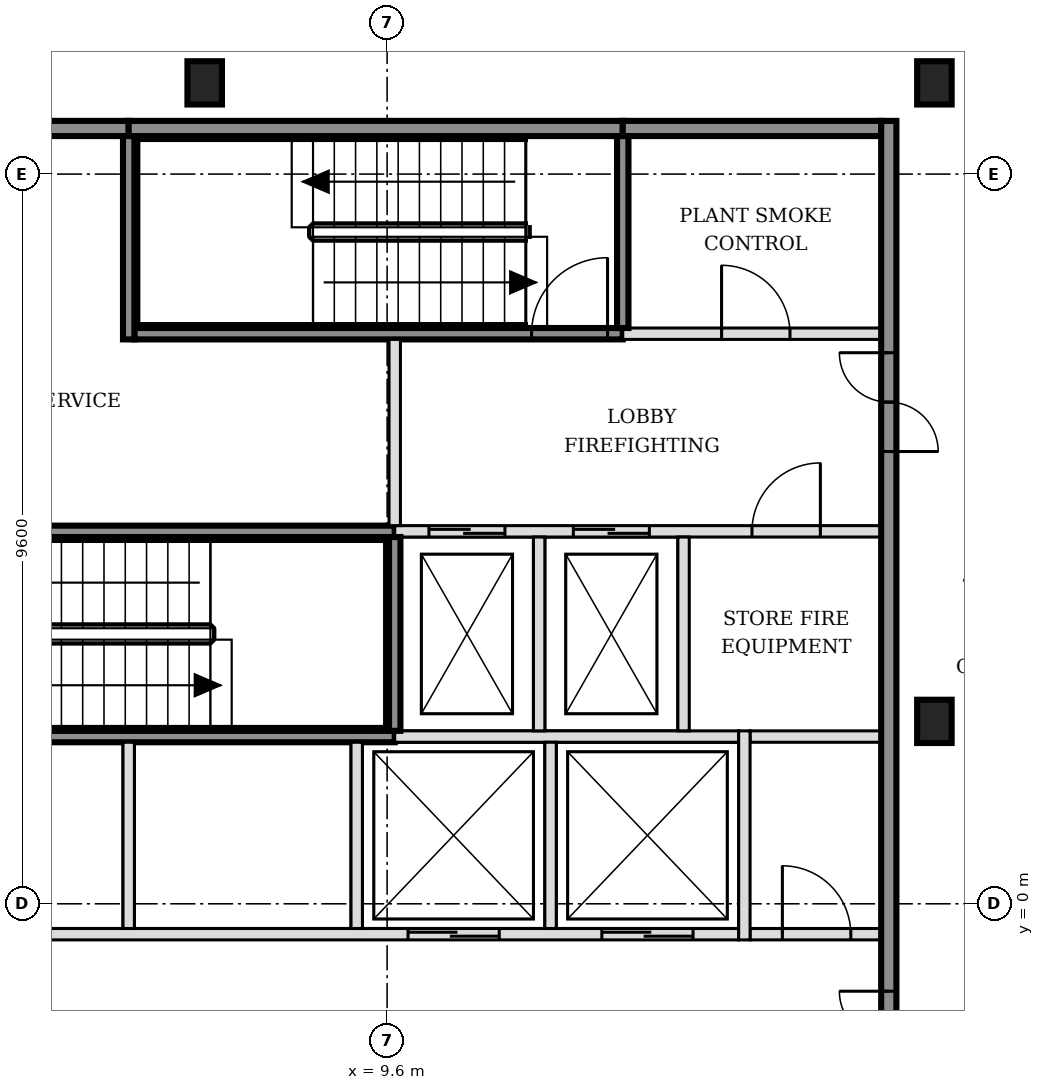
"""IFC4 building model, lengths in metres.
Left out: names, types, materials, properties, quantities, classifications, styles, units other than length and angle.
Written with IfcOpenShell. Run it as: python <this file> out.ifc"""

import sys

from ifc_helpers import new_model, si_unit, direction, frame, frame_2d, origin, origin_2d, place, context, subcontext, project, spatial, rectangle, i_section, extrude, element, fill, save


model = new_model("IFC4")
c1 = context("Model", 3, precision=1e-05, world=origin(), true_north=direction((0.0, 1.0)))
c2 = subcontext(c1, "Body", "Model", "MODEL_VIEW")
j1 = project(units=[si_unit("LENGTHUNIT", "METRE"), si_unit("PLANEANGLEUNIT", "RADIAN")], contexts=[c1])
p1 = place(None, origin())
s1 = spatial("IfcSite", under=j1, at=p1, CompositionType="ELEMENT")
p2 = place(p1, origin())
s2 = spatial("IfcBuilding", under=s1, at=p2, CompositionType="ELEMENT")
p3 = place(p2, frame((0.0, 0.0, 47.4)))
s3 = spatial("IfcBuildingStorey", under=s2, at=p3, CompositionType="ELEMENT", Elevation=47.4)
for number, where, z_axis, x_axis in (
    (1, (16.8, 2.4, -0.15), (0.0, 0.0, 1.0), (1.0, 0.0, 0.0)),
    (2, (7.2, 10.8, -0.15), (0.0, 0.0, 1.0), (1.0, 0.0, 0.0)),
    (3, (16.8, 10.8, -0.15), (0.0, 0.0, 1.0), (1.0, 0.0, 0.0)),
):
    element("IfcColumn", number, at=place(p3, frame(where, z_axis=z_axis, x_axis=x_axis)), inside=s3, PredefinedType="COLUMN", context=c2, shape_type="SweptSolid", body=[
        extrude(i_section(OverallWidth=0.454, OverallDepth=0.569, WebThickness=0.078, FlangeThickness=0.125, FilletRadius=0.015, at=origin_2d()), origin(), (0.0, 0.0, 1.0), 3.6),
    ])
p4 = place(p3, frame((-1.7, -0.4, 0.0), z_axis=(0.0, 0.0, 1.0), x_axis=(1.0, 0.0, 0.0)))
e4 = element("IfcWall", 4, at=p4, inside=s3, PredefinedType="SOLIDWALL", context=c2, shape_type="SweptSolid", body=[
    extrude(rectangle(XDim=15.925, YDim=0.15, at=frame_2d((7.962, 0.0))), origin(), (0.0, 0.0, 1.0), 3.45),
])
p5 = place(p4, frame((0.6, 0.0, 0.0)))
e5 = element("IfcOpeningElement", 5, at=p5, cuts=e4, PredefinedType="OPENING", context=c2, shape_type="SweptSolid", body=[
    extrude(rectangle(XDim=1.1, YDim=2.1, at=frame_2d((0.55, 1.05))), frame((0.0, 0.085, 0.0), z_axis=(0.0, -1.0, 0.0), x_axis=(1.0, 0.0, 0.0)), (0.0, 0.0, 1.0), 0.17),
])
p6 = place(p4, frame((3.1, 0.0, 0.0)))
e6 = element("IfcOpeningElement", 6, at=p6, cuts=e4, PredefinedType="OPENING", context=c2, shape_type="SweptSolid", body=[
    extrude(rectangle(XDim=1.1, YDim=2.1, at=frame_2d((0.55, 1.05))), frame((0.0, 0.085, 0.0), z_axis=(0.0, -1.0, 0.0), x_axis=(1.0, 0.0, 0.0)), (0.0, 0.0, 1.0), 0.17),
])
p7 = place(p4, frame((11.575, 0.0, 0.0)))
e7 = element("IfcOpeningElement", 7, at=p7, cuts=e4, PredefinedType="OPENING", context=c2, shape_type="SweptSolid", body=[
    extrude(rectangle(XDim=1.2, YDim=2.1, at=frame_2d((0.6, 1.05))), frame((0.0, 0.085, 0.0), z_axis=(0.0, -1.0, 0.0), x_axis=(1.0, 0.0, 0.0)), (0.0, 0.0, 1.0), 0.17),
])
p8 = place(p4, frame((14.125, 0.0, 0.0)))
e8 = element("IfcOpeningElement", 8, at=p8, cuts=e4, PredefinedType="OPENING", context=c2, shape_type="SweptSolid", body=[
    extrude(rectangle(XDim=1.2, YDim=2.1, at=frame_2d((0.6, 1.05))), frame((0.0, 0.085, 0.0), z_axis=(0.0, -1.0, 0.0), x_axis=(1.0, 0.0, 0.0)), (0.0, 0.0, 1.0), 0.17),
])
p9 = place(p3, frame((14.375, -0.4, 0.0), z_axis=(0.0, 0.0, 1.0), x_axis=(1.0, 0.0, 0.0)))
e9 = element("IfcWall", 9, at=p9, inside=s3, PredefinedType="PARTITIONING", context=c2, shape_type="SweptSolid", body=[
    extrude(rectangle(XDim=1.725, YDim=0.15, at=frame_2d((0.863, 0.0))), origin(), (0.0, 0.0, 1.0), 3.45),
])
p10 = place(p9, frame((0.425, 0.0, 0.0)))
e10 = element("IfcOpeningElement", 10, at=p10, cuts=e9, PredefinedType="OPENING", context=c2, shape_type="SweptSolid", body=[
    extrude(rectangle(XDim=0.9, YDim=2.1, at=frame_2d((0.45, 1.05))), frame((0.0, 0.085, 0.0), z_axis=(0.0, -1.0, 0.0), x_axis=(1.0, 0.0, 0.0)), (0.0, 0.0, 1.0), 0.17),
])
p11 = place(p3, frame((3.2, 2.2, 0.0), z_axis=(0.0, 0.0, 1.0), x_axis=(1.0, 0.0, 0.0)))
e11 = element("IfcWall", 11, at=p11, inside=s3, PredefinedType="SOLIDWALL", context=c2, shape_type="SweptSolid", body=[
    extrude(rectangle(XDim=6.5, YDim=0.15, at=frame_2d((3.25, 0.0))), origin(), (0.0, 0.0, 1.0), 3.45),
])
p12 = place(p3, frame((9.7, 2.2, 0.0), z_axis=(0.0, 0.0, 1.0), x_axis=(1.0, 0.0, 0.0)))
e12 = element("IfcWall", 12, at=p12, inside=s3, PredefinedType="SOLIDWALL", context=c2, shape_type="SweptSolid", body=[
    extrude(rectangle(XDim=4.525, YDim=0.15, at=frame_2d((2.263, 0.0))), origin(), (0.0, 0.0, 1.0), 3.45),
])
p13 = place(p3, frame((14.375, 2.2, 0.0), z_axis=(0.0, 0.0, 1.0), x_axis=(1.0, 0.0, 0.0)))
e13 = element("IfcWall", 13, at=p13, inside=s3, PredefinedType="PARTITIONING", context=c2, shape_type="SweptSolid", body=[
    extrude(rectangle(XDim=1.725, YDim=0.15, at=frame_2d((0.863, 0.0))), origin(), (0.0, 0.0, 1.0), 3.45),
])
p14 = place(p3, frame((3.275, 4.9, 0.0), z_axis=(0.0, 0.0, 1.0), x_axis=(1.0, 0.0, 0.0)))
e14 = element("IfcWall", 14, at=p14, inside=s3, PredefinedType="SOLIDWALL", context=c2, shape_type="SweptSolid", body=[
    extrude(rectangle(XDim=6.425, YDim=0.15, at=frame_2d((3.212, 0.0))), origin(), (0.0, 0.0, 1.0), 3.45),
])
p15 = place(p14, frame((0.1, 0.0, 0.0)))
e15 = element("IfcOpeningElement", 15, at=p15, cuts=e14, PredefinedType="OPENING", context=c2, shape_type="SweptSolid", body=[
    extrude(rectangle(XDim=1.0, YDim=2.1, at=frame_2d((0.5, 1.05))), frame((0.0, 0.085, 0.0), z_axis=(0.0, -1.0, 0.0), x_axis=(1.0, 0.0, 0.0)), (0.0, 0.0, 1.0), 0.17),
])
p16 = place(p3, frame((9.7, 4.9, 0.0), z_axis=(0.0, 0.0, 1.0), x_axis=(1.0, 0.0, 0.0)))
e16 = element("IfcWall", 16, at=p16, inside=s3, PredefinedType="SOLIDWALL", context=c2, shape_type="SweptSolid", body=[
    extrude(rectangle(XDim=6.4, YDim=0.15, at=frame_2d((3.2, 0.0))), origin(), (0.0, 0.0, 1.0), 3.45),
])
p17 = place(p16, frame((0.45, 0.0, 0.0)))
e17 = element("IfcOpeningElement", 17, at=p17, cuts=e16, PredefinedType="OPENING", context=c2, shape_type="SweptSolid", body=[
    extrude(rectangle(XDim=1.0, YDim=2.1, at=frame_2d((0.5, 1.05))), frame((0.0, 0.085, 0.0), z_axis=(0.0, -1.0, 0.0), x_axis=(1.0, 0.0, 0.0)), (0.0, 0.0, 1.0), 0.17),
])
p18 = place(p16, frame((2.35, 0.0, 0.0)))
e18 = element("IfcOpeningElement", 18, at=p18, cuts=e16, PredefinedType="OPENING", context=c2, shape_type="SweptSolid", body=[
    extrude(rectangle(XDim=1.0, YDim=2.1, at=frame_2d((0.5, 1.05))), frame((0.0, 0.085, 0.0), z_axis=(0.0, -1.0, 0.0), x_axis=(1.0, 0.0, 0.0)), (0.0, 0.0, 1.0), 0.17),
])
p19 = place(p16, frame((4.7, 0.0, 0.0)))
e19 = element("IfcOpeningElement", 19, at=p19, cuts=e16, PredefinedType="OPENING", context=c2, shape_type="SweptSolid", body=[
    extrude(rectangle(XDim=0.9, YDim=2.1, at=frame_2d((0.45, 1.05))), frame((0.0, 0.085, 0.0), z_axis=(0.0, -1.0, 0.0), x_axis=(1.0, 0.0, 0.0)), (0.0, 0.0, 1.0), 0.17),
])
p20 = place(p3, frame((6.275, 7.5, 0.0), z_axis=(0.0, 0.0, 1.0), x_axis=(1.0, 0.0, 0.0)))
e20 = element("IfcWall", 20, at=p20, inside=s3, PredefinedType="SOLIDWALL", context=c2, shape_type="SweptSolid", body=[
    extrude(rectangle(XDim=6.425, YDim=0.15, at=frame_2d((3.212, 0.0))), origin(), (0.0, 0.0, 1.0), 3.45),
])
p21 = place(p20, frame((5.225, 0.0, 0.0)))
e21 = element("IfcOpeningElement", 21, at=p21, cuts=e20, PredefinedType="OPENING", context=c2, shape_type="SweptSolid", body=[
    extrude(rectangle(XDim=1.0, YDim=2.1, at=frame_2d((0.5, 1.05))), frame((0.0, 0.085, 0.0), z_axis=(0.0, -1.0, 0.0), x_axis=(1.0, 0.0, 0.0)), (0.0, 0.0, 1.0), 0.17),
])
p22 = place(p3, frame((12.7, 7.5, 0.0), z_axis=(0.0, 0.0, 1.0), x_axis=(1.0, 0.0, 0.0)))
e22 = element("IfcWall", 22, at=p22, inside=s3, PredefinedType="SOLIDWALL", context=c2, shape_type="SweptSolid", body=[
    extrude(rectangle(XDim=3.4, YDim=0.15, at=frame_2d((1.7, 0.0))), origin(), (0.0, 0.0, 1.0), 3.45),
])
p23 = place(p22, frame((1.3, 0.0, 0.0)))
e23 = element("IfcOpeningElement", 23, at=p23, cuts=e22, PredefinedType="OPENING", context=c2, shape_type="SweptSolid", body=[
    extrude(rectangle(XDim=0.9, YDim=2.1, at=frame_2d((0.45, 1.05))), frame((0.0, 0.085, 0.0), z_axis=(0.0, -1.0, 0.0), x_axis=(1.0, 0.0, 0.0)), (0.0, 0.0, 1.0), 0.17),
])
p24 = place(p3, frame((-1.7, 10.2, 0.0), z_axis=(0.0, 0.0, 1.0), x_axis=(1.0, 0.0, 0.0)))
e24 = element("IfcWall", 24, at=p24, inside=s3, PredefinedType="SOLIDWALL", context=c2, shape_type="SweptSolid", body=[
    extrude(rectangle(XDim=7.9, YDim=0.2, at=frame_2d((3.95, 0.0))), origin(), (0.0, 0.0, 1.0), 3.45),
])
p25 = place(p3, frame((6.2, 10.2, 0.0), z_axis=(0.0, 0.0, 1.0), x_axis=(1.0, 0.0, 0.0)))
e25 = element("IfcWall", 25, at=p25, inside=s3, PredefinedType="SOLIDWALL", context=c2, shape_type="SweptSolid", body=[
    extrude(rectangle(XDim=6.5, YDim=0.2, at=frame_2d((3.25, 0.0))), origin(), (0.0, 0.0, 1.0), 3.45),
])
p26 = place(p3, frame((12.7, 10.2, 0.0), z_axis=(0.0, 0.0, 1.0), x_axis=(1.0, 0.0, 0.0)))
e26 = element("IfcWall", 26, at=p26, inside=s3, PredefinedType="SOLIDWALL", context=c2, shape_type="SweptSolid", body=[
    extrude(rectangle(XDim=3.4, YDim=0.2, at=frame_2d((1.7, 0.0))), origin(), (0.0, 0.0, 1.0), 3.45),
])
p27 = place(p3, frame((6.2, -0.325, 0.0), z_axis=(0.0, 0.0, 1.0), x_axis=(0.0, 1.0, 0.0)))
e27 = element("IfcWall", 27, at=p27, inside=s3, PredefinedType="SOLIDWALL", context=c2, shape_type="SweptSolid", body=[
    extrude(rectangle(XDim=2.45, YDim=0.15, at=frame_2d((1.225, 0.0))), origin(), (0.0, 0.0, 1.0), 3.45),
])
p28 = place(p3, frame((6.2, 7.425, 0.0), z_axis=(0.0, 0.0, 1.0), x_axis=(0.0, 1.0, 0.0)))
e28 = element("IfcWall", 28, at=p28, inside=s3, PredefinedType="SOLIDWALL", context=c2, shape_type="SweptSolid", body=[
    extrude(rectangle(XDim=2.675, YDim=0.15, at=frame_2d((1.337, 0.0))), origin(), (0.0, 0.0, 1.0), 3.45),
])
p29 = place(p3, frame((9.2, -0.325, 0.0), z_axis=(0.0, 0.0, 1.0), x_axis=(0.0, 1.0, 0.0)))
e29 = element("IfcWall", 29, at=p29, inside=s3, PredefinedType="SOLIDWALL", context=c2, shape_type="SweptSolid", body=[
    extrude(rectangle(XDim=2.45, YDim=0.15, at=frame_2d((1.225, 0.0))), origin(), (0.0, 0.0, 1.0), 3.45),
])
p30 = place(p3, frame((9.7, 2.275, 0.0), z_axis=(0.0, 0.0, 1.0), x_axis=(0.0, 1.0, 0.0)))
e30 = element("IfcWall", 30, at=p30, inside=s3, PredefinedType="SOLIDWALL", context=c2, shape_type="SweptSolid", body=[
    extrude(rectangle(XDim=2.55, YDim=0.15, at=frame_2d((1.275, 0.0))), origin(), (0.0, 0.0, 1.0), 3.45),
])
p31 = place(p3, frame((9.7, 4.975, 0.0), z_axis=(0.0, 0.0, 1.0), x_axis=(0.0, 1.0, 0.0)))
e31 = element("IfcWall", 31, at=p31, inside=s3, PredefinedType="SOLIDWALL", context=c2, shape_type="SweptSolid", body=[
    extrude(rectangle(XDim=2.45, YDim=0.15, at=frame_2d((1.225, 0.0))), origin(), (0.0, 0.0, 1.0), 3.45),
])
p32 = place(p3, frame((11.6, 2.275, 0.0), z_axis=(0.0, 0.0, 1.0), x_axis=(0.0, 1.0, 0.0)))
e32 = element("IfcWall", 32, at=p32, inside=s3, PredefinedType="SOLIDWALL", context=c2, shape_type="SweptSolid", body=[
    extrude(rectangle(XDim=2.55, YDim=0.15, at=frame_2d((1.275, 0.0))), origin(), (0.0, 0.0, 1.0), 3.45),
])
p33 = place(p3, frame((11.75, -0.325, 0.0), z_axis=(0.0, 0.0, 1.0), x_axis=(0.0, 1.0, 0.0)))
e33 = element("IfcWall", 33, at=p33, inside=s3, PredefinedType="SOLIDWALL", context=c2, shape_type="SweptSolid", body=[
    extrude(rectangle(XDim=2.45, YDim=0.15, at=frame_2d((1.225, 0.0))), origin(), (0.0, 0.0, 1.0), 3.45),
])
p34 = place(p3, frame((12.7, 7.575, 0.0), z_axis=(0.0, 0.0, 1.0), x_axis=(0.0, 1.0, 0.0)))
e34 = element("IfcWall", 34, at=p34, inside=s3, PredefinedType="SOLIDWALL", context=c2, shape_type="SweptSolid", body=[
    extrude(rectangle(XDim=2.525, YDim=0.15, at=frame_2d((1.263, 0.0))), origin(), (0.0, 0.0, 1.0), 3.45),
])
p35 = place(p3, frame((13.5, 2.275, 0.0), z_axis=(0.0, 0.0, 1.0), x_axis=(0.0, 1.0, 0.0)))
e35 = element("IfcWall", 35, at=p35, inside=s3, PredefinedType="SOLIDWALL", context=c2, shape_type="SweptSolid", body=[
    extrude(rectangle(XDim=2.55, YDim=0.15, at=frame_2d((1.275, 0.0))), origin(), (0.0, 0.0, 1.0), 3.45),
])
p36 = place(p3, frame((14.3, -0.475, 0.0), z_axis=(0.0, 0.0, 1.0), x_axis=(0.0, 1.0, 0.0)))
e36 = element("IfcWall", 36, at=p36, inside=s3, PredefinedType="SOLIDWALL", context=c2, shape_type="SweptSolid", body=[
    extrude(rectangle(XDim=2.75, YDim=0.15, at=frame_2d((1.375, 0.0))), origin(), (0.0, 0.0, 1.0), 3.45),
])
p37 = place(p3, frame((16.2, -5.5, 0.0), z_axis=(0.0, 0.0, 1.0), x_axis=(0.0, 1.0, 0.0)))
e37 = element("IfcWall", 37, at=p37, inside=s3, PredefinedType="SOLIDWALL", context=c2, shape_type="SweptSolid", body=[
    extrude(rectangle(XDim=15.8, YDim=0.2, at=frame_2d((7.9, 0.0))), origin(), (0.0, 0.0, 1.0), 3.45),
])
p38 = place(p37, frame((3.05, 0.0, 0.0)))
e38 = element("IfcOpeningElement", 38, at=p38, cuts=e37, PredefinedType="OPENING", context=c2, shape_type="SweptSolid", body=[
    extrude(rectangle(XDim=1.3, YDim=2.1, at=frame_2d((0.65, 1.05))), frame((0.0, 0.11, 0.0), z_axis=(0.0, -1.0, 0.0), x_axis=(1.0, 0.0, 0.0)), (0.0, 0.0, 1.0), 0.22),
])
p39 = place(p37, frame((11.45, 0.0, 0.0)))
e39 = element("IfcOpeningElement", 39, at=p39, cuts=e37, PredefinedType="OPENING", context=c2, shape_type="SweptSolid", body=[
    extrude(rectangle(XDim=1.3, YDim=2.1, at=frame_2d((0.65, 1.05))), frame((0.0, 0.11, 0.0), z_axis=(0.0, -1.0, 0.0), x_axis=(1.0, 0.0, 0.0)), (0.0, 0.0, 1.0), 0.22),
])
p40 = place(p7, origin())
e40 = element("IfcDoor", 40, at=p40, inside=s3, OperationType="DOUBLE_DOOR_SLIDING", PredefinedType="DOOR", context=c2, shape_type="SweptSolid", body=[
    extrude(rectangle(XDim=1.2, YDim=2.1, at=frame_2d((0.6, 1.05))), frame((0.0, 0.025, 0.0), z_axis=(0.0, -1.0, 0.0), x_axis=(1.0, 0.0, 0.0)), (0.0, 0.0, 1.0), 0.05),
])
fill(e7, e40)
p41 = place(p8, origin())
e41 = element("IfcDoor", 41, at=p41, inside=s3, OperationType="DOUBLE_DOOR_SLIDING", PredefinedType="DOOR", context=c2, shape_type="SweptSolid", body=[
    extrude(rectangle(XDim=1.2, YDim=2.1, at=frame_2d((0.6, 1.05))), frame((0.0, 0.025, 0.0), z_axis=(0.0, -1.0, 0.0), x_axis=(1.0, 0.0, 0.0)), (0.0, 0.0, 1.0), 0.05),
])
fill(e8, e41)
p42 = place(p17, origin())
e42 = element("IfcDoor", 42, at=p42, inside=s3, OperationType="DOUBLE_DOOR_SLIDING", PredefinedType="DOOR", context=c2, shape_type="SweptSolid", body=[
    extrude(rectangle(XDim=1.0, YDim=2.1, at=frame_2d((0.5, 1.05))), frame((0.0, 0.025, 0.0), z_axis=(0.0, -1.0, 0.0), x_axis=(1.0, 0.0, 0.0)), (0.0, 0.0, 1.0), 0.05),
])
fill(e17, e42)
p43 = place(p18, origin())
e43 = element("IfcDoor", 43, at=p43, inside=s3, OperationType="DOUBLE_DOOR_SLIDING", PredefinedType="DOOR", context=c2, shape_type="SweptSolid", body=[
    extrude(rectangle(XDim=1.0, YDim=2.1, at=frame_2d((0.5, 1.05))), frame((0.0, 0.025, 0.0), z_axis=(0.0, -1.0, 0.0), x_axis=(1.0, 0.0, 0.0)), (0.0, 0.0, 1.0), 0.05),
])
fill(e18, e43)
p44 = place(p21, origin())
e44 = element("IfcDoor", 44, at=p44, inside=s3, OperationType="SINGLE_SWING_RIGHT", PredefinedType="DOOR", context=c2, shape_type="SweptSolid", body=[
    extrude(rectangle(XDim=1.0, YDim=2.1, at=frame_2d((0.5, 1.05))), frame((0.0, 0.025, 0.0), z_axis=(0.0, -1.0, 0.0), x_axis=(1.0, 0.0, 0.0)), (0.0, 0.0, 1.0), 0.05),
])
fill(e21, e44)
p45 = place(p38, origin())
e45 = element("IfcDoor", 45, at=p45, inside=s3, OperationType="DOUBLE_DOOR_SINGLE_SWING", PredefinedType="DOOR", context=c2, shape_type="SweptSolid", body=[
    extrude(rectangle(XDim=1.3, YDim=2.1, at=frame_2d((0.65, 1.05))), frame((0.0, 0.025, 0.0), z_axis=(0.0, -1.0, 0.0), x_axis=(1.0, 0.0, 0.0)), (0.0, 0.0, 1.0), 0.05),
])
fill(e38, e45)
p46 = place(p39, origin())
e46 = element("IfcDoor", 46, at=p46, inside=s3, OperationType="DOUBLE_DOOR_SINGLE_SWING", PredefinedType="DOOR", context=c2, shape_type="SweptSolid", body=[
    extrude(rectangle(XDim=1.3, YDim=2.1, at=frame_2d((0.65, 1.05))), frame((0.0, 0.025, 0.0), z_axis=(0.0, -1.0, 0.0), x_axis=(1.0, 0.0, 0.0)), (0.0, 0.0, 1.0), 0.05),
])
fill(e39, e46)
p47 = place(p10, origin())
e47 = element("IfcDoor", 47, at=p47, inside=s3, OperationType="SINGLE_SWING_LEFT", PredefinedType="DOOR", context=c2, shape_type="SweptSolid", body=[
    extrude(rectangle(XDim=0.9, YDim=2.1, at=frame_2d((0.45, 1.05))), frame((0.0, 0.025, 0.0), z_axis=(0.0, -1.0, 0.0), x_axis=(1.0, 0.0, 0.0)), (0.0, 0.0, 1.0), 0.05),
])
fill(e10, e47)
p48 = place(p19, origin())
e48 = element("IfcDoor", 48, at=p48, inside=s3, OperationType="SINGLE_SWING_RIGHT", PredefinedType="DOOR", context=c2, shape_type="SweptSolid", body=[
    extrude(rectangle(XDim=0.9, YDim=2.1, at=frame_2d((0.45, 1.05))), frame((0.0, 0.025, 0.0), z_axis=(0.0, -1.0, 0.0), x_axis=(1.0, 0.0, 0.0)), (0.0, 0.0, 1.0), 0.05),
])
fill(e19, e48)
p49 = place(p23, origin())
e49 = element("IfcDoor", 49, at=p49, inside=s3, OperationType="SINGLE_SWING_LEFT", PredefinedType="DOOR", context=c2, shape_type="SweptSolid", body=[
    extrude(rectangle(XDim=0.9, YDim=2.1, at=frame_2d((0.45, 1.05))), frame((0.0, 0.025, 0.0), z_axis=(0.0, -1.0, 0.0), x_axis=(1.0, 0.0, 0.0)), (0.0, 0.0, 1.0), 0.05),
])
fill(e23, e49)
save(model, sys.argv[1])
